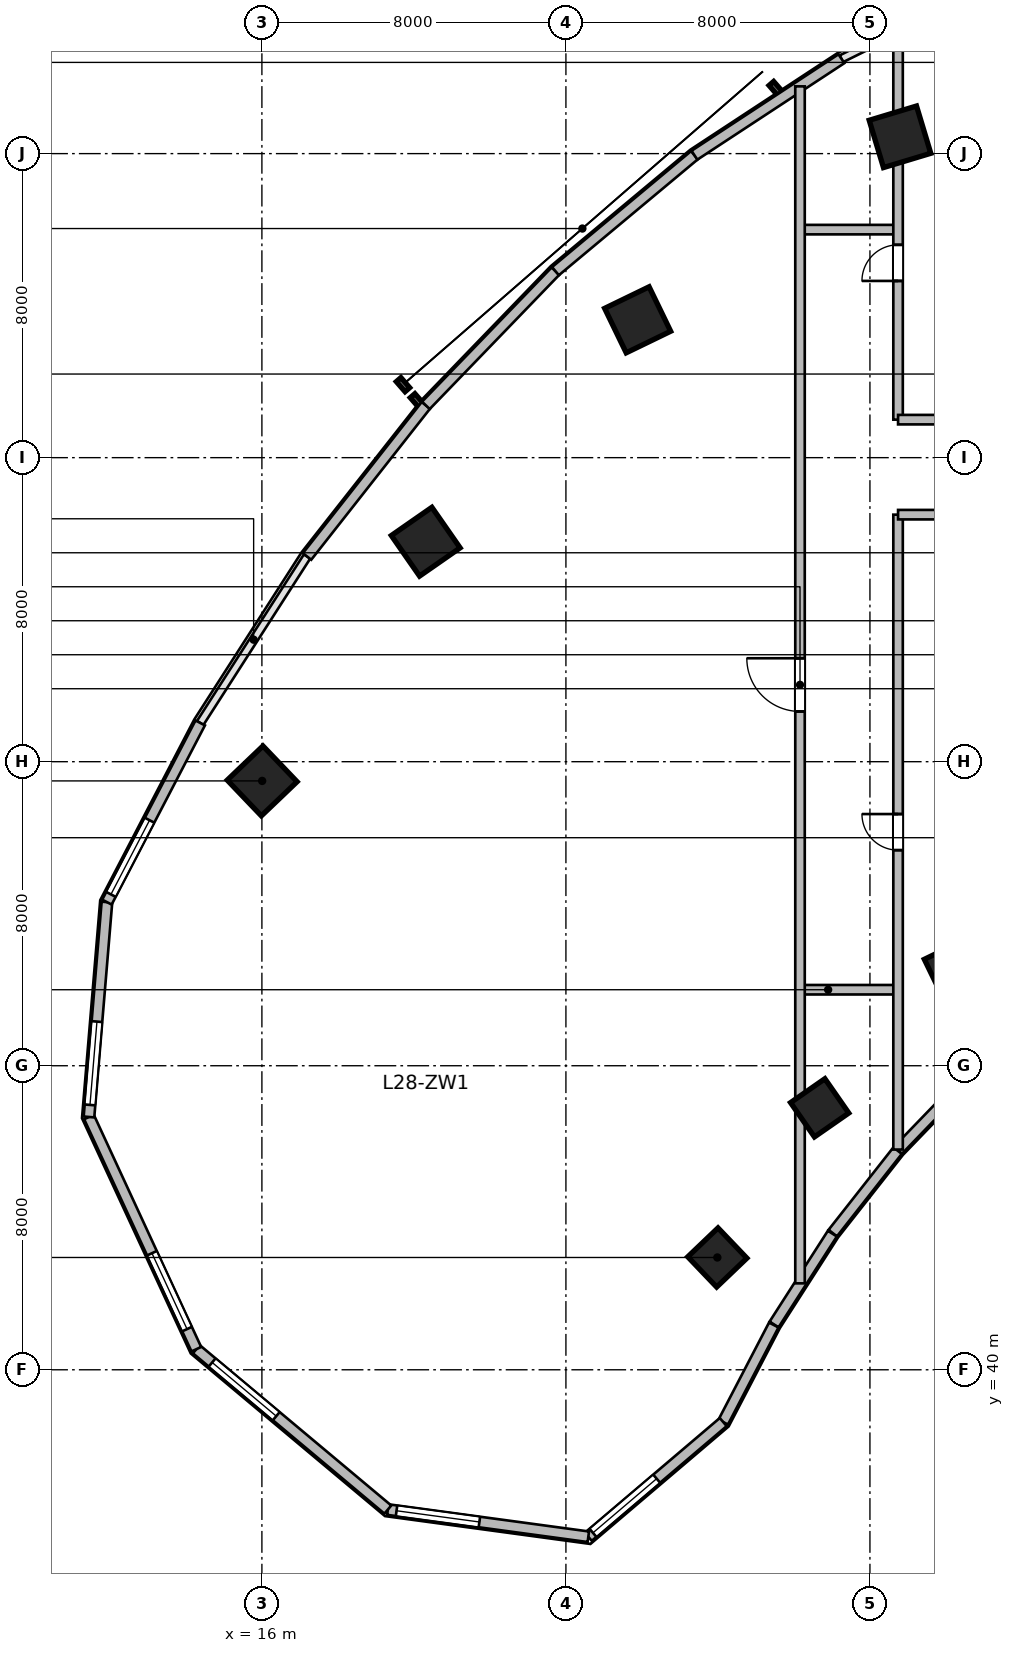
"""IFC4 building model, lengths in metres.
Left out: names, types, materials, properties, quantities, classifications, styles, units other than length and angle.
Written with IfcOpenShell. Run it as: python <this file> out.ifc"""

import sys

from ifc_helpers import new_model, si_unit, direction, frame, frame_2d, origin, origin_2d, place, context, subcontext, project, spatial, rectangle, extrude, source, transform, mapped, element, fill, save


model = new_model("IFC4")
c1 = context("Model", 3, precision=1e-05, world=origin(), true_north=direction((0.0, 1.0)))
c2 = subcontext(c1, "Body", "Model", "MODEL_VIEW")
j1 = project(units=[si_unit("LENGTHUNIT", "METRE"), si_unit("PLANEANGLEUNIT", "RADIAN")], contexts=[c1])
p1 = place(None, origin())
s1 = spatial("IfcSite", under=j1, at=p1, CompositionType="ELEMENT")
p2 = place(p1, origin())
s2 = spatial("IfcBuilding", under=s1, at=p2, CompositionType="ELEMENT")
p3 = place(p2, frame((0.0, 0.0, 119.4)))
s3 = spatial("IfcBuildingStorey", under=s2, at=p3, CompositionType="ELEMENT", Elevation=119.4)
m1 = source(origin(), c2, "Body", "SweptSolid", [
    extrude(rectangle(XDim=1.1, YDim=1.1, at=origin_2d()), origin(), (0.0, 0.0, 1.0), 3.9),
])
p4 = place(p3, frame((27.985, 42.955, 0.0), z_axis=(0.0, 0.0, 1.0), x_axis=(-0.690756218984, 0.723087716626, 0.0)))
e1 = element("IfcColumn", 1, at=p4, inside=s3, PredefinedType="COLUMN", context=c2, shape_type="MappedRepresentation", body=[
    mapped(m1, transform((0.0, 0.0, 0.0), scale=1.0)),
])
m2 = source(origin(), c2, "Body", "SweptSolid", [
    extrude(rectangle(XDim=1.3, YDim=1.3, at=origin_2d()), origin(), (0.0, 0.0, 1.0), 3.9),
])
p5 = place(p3, frame((16.007, 55.494, 0.0), z_axis=(0.0, 0.0, 1.0), x_axis=(-0.690756218984, 0.723087716626, 0.0)))
e2 = element("IfcColumn", 2, at=p5, inside=s3, PredefinedType="COLUMN", context=c2, shape_type="MappedRepresentation", body=[
    mapped(m2, transform((0.0, 0.0, 0.0), scale=1.0)),
])
p6 = place(p3, frame((30.677, 46.892, 0.0), z_axis=(0.0, 0.0, 1.0), x_axis=(-0.571143442153, 0.820850271661, 0.0)))
e3 = element("IfcColumn", 3, at=p6, inside=s3, PredefinedType="COLUMN", context=c2, shape_type="MappedRepresentation", body=[
    mapped(m1, transform((0.0, 0.0, 0.0), scale=1.0)),
])
p7 = place(p3, frame((20.311, 61.789, 0.0), z_axis=(0.0, 0.0, 1.0), x_axis=(-0.571143442153, 0.820850271661, 0.0)))
e4 = element("IfcColumn", 4, at=p7, inside=s3, PredefinedType="COLUMN", context=c2, shape_type="MappedRepresentation", body=[
    mapped(m2, transform((0.0, 0.0, 0.0), scale=1.0)),
])
p8 = place(p3, frame((34.166, 50.545, 0.0), z_axis=(0.0, 0.0, 1.0), x_axis=(-0.436173672171, 0.899862504889, 0.0)))
e5 = element("IfcColumn", 5, at=p8, inside=s3, PredefinedType="COLUMN", context=c2, shape_type="MappedRepresentation", body=[
    mapped(m1, transform((0.0, 0.0, 0.0), scale=1.0)),
])
for number, where, z_axis, x_axis in (
    (6, (25.888, 67.627, 0.0), (0.0, 0.0, 1.0), (-0.436, 0.9, 0.0)),
    (7, (32.791, 72.442, 0.0), (0.0, 0.0, 1.0), (-0.289, 0.957, 0.0)),
):
    element("IfcColumn", number, at=place(p3, frame(where, z_axis=z_axis, x_axis=x_axis)), inside=s3, PredefinedType="COLUMN", context=c2, shape_type="MappedRepresentation", body=[
        mapped(m2, transform((0.0, 0.0, 0.0), scale=1.0)),
    ])
m3 = source(origin(), c2, "Body", "SweptSolid", [
    extrude(rectangle(XDim=2.68, YDim=0.28, at=frame_2d((1.34, 0.0))), origin(), (0.0, 0.0, 1.0), 3.65),
])
p9 = place(p3, frame((34.601, 47.708, 0.0), z_axis=(0.0, 0.0, 1.0), x_axis=(-0.694561996568, -0.719432855049, 0.0)))
e8 = element("IfcWall", 8, at=p9, inside=s3, PredefinedType="SOLIDWALL", context=c2, shape_type="MappedRepresentation", body=[
    mapped(m3, transform((0.0, 0.0, 0.0), scale=1.0)),
])
m4 = source(origin(), c2, "Body", "SweptSolid", [
    extrude(rectangle(XDim=2.76, YDim=0.28, at=frame_2d((1.38, 0.0))), origin(), (0.0, 0.0, 1.0), 3.65),
])
p10 = place(p3, frame((32.728, 45.766, 0.0), z_axis=(0.0, 0.0, 1.0), x_axis=(-0.618180818641, -0.786035925047, 0.0)))
e9 = element("IfcWall", 9, at=p10, inside=s3, PredefinedType="SOLIDWALL", context=c2, shape_type="MappedRepresentation", body=[
    mapped(m4, transform((0.0, 0.0, 0.0), scale=1.0)),
])
m5 = source(origin(), c2, "Body", "SweptSolid", [
    extrude(rectangle(XDim=2.84, YDim=0.28, at=frame_2d((1.42, 0.0))), origin(), (0.0, 0.0, 1.0), 3.65),
])
p11 = place(p3, frame((31.011, 43.582, 0.0), z_axis=(0.0, 0.0, 1.0), x_axis=(-0.540214368057, -0.841527442538, 0.0)))
e10 = element("IfcWall", 10, at=p11, inside=s3, PredefinedType="SOLIDWALL", context=c2, shape_type="MappedRepresentation", body=[
    mapped(m5, transform((0.0, 0.0, 0.0), scale=1.0)),
])
m6 = source(origin(), c2, "Body", "SweptSolid", [
    extrude(rectangle(XDim=2.88, YDim=0.28, at=frame_2d((1.44, 0.0))), origin(), (0.0, 0.0, 1.0), 3.65),
])
p12 = place(p3, frame((29.469, 41.178, 0.0), z_axis=(0.0, 0.0, 1.0), x_axis=(-0.461769086658, -0.887000175088, 0.0)))
e11 = element("IfcWall", 11, at=p12, inside=s3, PredefinedType="SOLIDWALL", context=c2, shape_type="MappedRepresentation", body=[
    mapped(m6, transform((0.0, 0.0, 0.0), scale=1.0)),
])
m7 = source(origin(), c2, "Body", "SweptSolid", [
    extrude(rectangle(XDim=4.659, YDim=0.28, at=frame_2d((2.33, 0.0))), origin(), (0.0, 0.0, 1.0), 3.65),
])
p13 = place(p3, frame((28.139, 38.624, 0.0), z_axis=(0.0, 0.0, 1.0), x_axis=(-0.761913458795, -0.647678841176, 0.0)))
e12 = element("IfcWall", 12, at=p13, inside=s3, PredefinedType="SOLIDWALL", context=c2, shape_type="MappedRepresentation", body=[
    mapped(m7, transform((0.0, 0.0, 0.0), scale=1.0)),
])
p14 = place(p13, frame((2.299, 0.0, 0.95)))
e13 = element("IfcOpeningElement", 13, at=p14, cuts=e12, PredefinedType="OPENING", context=c2, shape_type="SweptSolid", body=[
    extrude(rectangle(XDim=2.2, YDim=2.1, at=frame_2d((1.1, 1.05))), frame((0.0, 0.15, 0.0), z_axis=(0.0, -1.0, 0.0), x_axis=(1.0, 0.0, 0.0)), (0.0, 0.0, 1.0), 0.3),
])
m8 = source(origin(), c2, "Body", "SweptSolid", [
    extrude(rectangle(XDim=5.324, YDim=0.28, at=frame_2d((2.662, 0.0))), origin(), (0.0, 0.0, 1.0), 3.65),
])
p15 = place(p3, frame((24.59, 35.606, 0.0), z_axis=(0.0, 0.0, 1.0), x_axis=(-0.990931467223, 0.134368252451, 0.0)))
e14 = element("IfcWall", 14, at=p15, inside=s3, PredefinedType="SOLIDWALL", context=c2, shape_type="MappedRepresentation", body=[
    mapped(m8, transform((0.0, 0.0, 0.0), scale=1.0)),
])
p16 = place(p15, frame((2.893, 0.0, 0.95)))
e15 = element("IfcOpeningElement", 15, at=p16, cuts=e14, PredefinedType="OPENING", context=c2, shape_type="SweptSolid", body=[
    extrude(rectangle(XDim=2.2, YDim=2.1, at=frame_2d((1.1, 1.05))), frame((0.0, 0.15, 0.0), z_axis=(0.0, -1.0, 0.0), x_axis=(1.0, 0.0, 0.0)), (0.0, 0.0, 1.0), 0.3),
])
m9 = source(origin(), c2, "Body", "SweptSolid", [
    extrude(rectangle(XDim=6.573, YDim=0.28, at=frame_2d((3.287, 0.0))), origin(), (0.0, 0.0, 1.0), 3.65),
])
p17 = place(p3, frame((19.314, 36.322, 0.0), z_axis=(0.0, 0.0, 1.0), x_axis=(-0.766715154163, 0.641987439423, 0.0)))
e16 = element("IfcWall", 16, at=p17, inside=s3, PredefinedType="SOLIDWALL", context=c2, shape_type="MappedRepresentation", body=[
    mapped(m9, transform((0.0, 0.0, 0.0), scale=1.0)),
])
p18 = place(p17, frame((3.83, 0.0, 0.95)))
e17 = element("IfcOpeningElement", 17, at=p18, cuts=e16, PredefinedType="OPENING", context=c2, shape_type="SweptSolid", body=[
    extrude(rectangle(XDim=2.2, YDim=2.1, at=frame_2d((1.1, 1.05))), frame((0.0, 0.15, 0.0), z_axis=(0.0, -1.0, 0.0), x_axis=(1.0, 0.0, 0.0)), (0.0, 0.0, 1.0), 0.3),
])
m10 = source(origin(), c2, "Body", "SweptSolid", [
    extrude(rectangle(XDim=6.732, YDim=0.28, at=frame_2d((3.366, 0.0))), origin(), (0.0, 0.0, 1.0), 3.65),
])
p19 = place(p3, frame((14.275, 40.541, 0.0), z_axis=(0.0, 0.0, 1.0), x_axis=(-0.419644552709, 0.907688520023, 0.0)))
e18 = element("IfcWall", 18, at=p19, inside=s3, PredefinedType="SOLIDWALL", context=c2, shape_type="MappedRepresentation", body=[
    mapped(m10, transform((0.0, 0.0, 0.0), scale=1.0)),
])
p20 = place(p19, frame((0.583, 0.0, 0.95)))
e19 = element("IfcOpeningElement", 19, at=p20, cuts=e18, PredefinedType="OPENING", context=c2, shape_type="SweptSolid", body=[
    extrude(rectangle(XDim=2.2, YDim=2.1, at=frame_2d((1.1, 1.05))), frame((0.0, 0.15, 0.0), z_axis=(0.0, -1.0, 0.0), x_axis=(1.0, 0.0, 0.0)), (0.0, 0.0, 1.0), 0.3),
])
m11 = source(origin(), c2, "Body", "SweptSolid", [
    extrude(rectangle(XDim=5.674, YDim=0.28, at=frame_2d((2.837, 0.0))), origin(), (0.0, 0.0, 1.0), 3.65),
])
p21 = place(p3, frame((11.45, 46.652, 0.0), z_axis=(0.0, 0.0, 1.0), x_axis=(0.083309007867, 0.996523762491, 0.0)))
e20 = element("IfcWall", 20, at=p21, inside=s3, PredefinedType="SOLIDWALL", context=c2, shape_type="MappedRepresentation", body=[
    mapped(m11, transform((0.0, 0.0, 0.0), scale=1.0)),
])
p22 = place(p21, frame((0.318, 0.0, 0.95)))
e21 = element("IfcOpeningElement", 21, at=p22, cuts=e20, PredefinedType="OPENING", context=c2, shape_type="SweptSolid", body=[
    extrude(rectangle(XDim=2.2, YDim=2.1, at=frame_2d((1.1, 1.05))), frame((0.0, 0.15, 0.0), z_axis=(0.0, -1.0, 0.0), x_axis=(1.0, 0.0, 0.0)), (0.0, 0.0, 1.0), 0.3),
])
m12 = source(origin(), c2, "Body", "SweptSolid", [
    extrude(rectangle(XDim=5.315, YDim=0.28, at=frame_2d((2.658, 0.0))), origin(), (0.0, 0.0, 1.0), 3.65),
])
p23 = place(p3, frame((11.922, 52.305, 0.0), z_axis=(0.0, 0.0, 1.0), x_axis=(0.461760527822, 0.887004630735, 0.0)))
e22 = element("IfcWall", 22, at=p23, inside=s3, PredefinedType="SOLIDWALL", context=c2, shape_type="MappedRepresentation", body=[
    mapped(m12, transform((0.0, 0.0, 0.0), scale=1.0)),
])
p24 = place(p23, frame((0.229, 0.0, 0.95)))
e23 = element("IfcOpeningElement", 23, at=p24, cuts=e22, PredefinedType="OPENING", context=c2, shape_type="SweptSolid", body=[
    extrude(rectangle(XDim=2.2, YDim=2.1, at=frame_2d((1.1, 1.05))), frame((0.0, 0.15, 0.0), z_axis=(0.0, -1.0, 0.0), x_axis=(1.0, 0.0, 0.0)), (0.0, 0.0, 1.0), 0.3),
])
m13 = source(origin(), c2, "Body", "SweptSolid", [
    extrude(rectangle(XDim=5.058, YDim=0.28, at=frame_2d((2.529, 0.0))), origin(), (0.0, 0.0, 1.0), 3.65),
])
p25 = place(p3, frame((17.188, 61.4, 0.0), z_axis=(0.0, 0.0, 1.0), x_axis=(0.618145507434, 0.786063694391, 0.0)))
e24 = element("IfcWall", 24, at=p25, inside=s3, PredefinedType="SOLIDWALL", context=c2, shape_type="MappedRepresentation", body=[
    mapped(m13, transform((0.0, 0.0, 0.0), scale=1.0)),
])
m14 = source(origin(), c2, "Body", "SweptSolid", [
    extrude(rectangle(XDim=4.908, YDim=0.28, at=frame_2d((2.454, 0.0))), origin(), (0.0, 0.0, 1.0), 3.65),
])
p26 = place(p3, frame((20.315, 65.376, 0.0), z_axis=(0.0, 0.0, 1.0), x_axis=(0.694613154328, 0.719383462302, 0.0)))
e25 = element("IfcWall", 25, at=p26, inside=s3, PredefinedType="SOLIDWALL", context=c2, shape_type="MappedRepresentation", body=[
    mapped(m14, transform((0.0, 0.0, 0.0), scale=1.0)),
])
m15 = source(origin(), c2, "Body", "SweptSolid", [
    extrude(rectangle(XDim=4.762, YDim=0.28, at=frame_2d((2.381, 0.0))), origin(), (0.0, 0.0, 1.0), 3.65),
])
p27 = place(p3, frame((23.725, 68.907, 0.0), z_axis=(0.0, 0.0, 1.0), x_axis=(0.767952279762, 0.640507061638, 0.0)))
e26 = element("IfcWall", 26, at=p27, inside=s3, PredefinedType="SOLIDWALL", context=c2, shape_type="MappedRepresentation", body=[
    mapped(m15, transform((0.0, 0.0, 0.0), scale=1.0)),
])
m16 = source(origin(), c2, "Body", "SweptSolid", [
    extrude(rectangle(XDim=4.626, YDim=0.28, at=frame_2d((2.313, 0.0))), origin(), (0.0, 0.0, 1.0), 3.65),
])
p28 = place(p3, frame((27.382, 71.958, 0.0), z_axis=(0.0, 0.0, 1.0), x_axis=(0.83595938331, 0.548791316855, 0.0)))
e27 = element("IfcWall", 27, at=p28, inside=s3, PredefinedType="SOLIDWALL", context=c2, shape_type="MappedRepresentation", body=[
    mapped(m16, transform((0.0, 0.0, 0.0), scale=1.0)),
])
m17 = source(origin(), c2, "Body", "SweptSolid", [
    extrude(rectangle(XDim=2.5, YDim=0.25, at=frame_2d((1.25, 0.0))), origin(), (0.0, 0.0, 1.0), 3.65),
])
for number, where, z_axis, x_axis in (
    (28, (30.2, 50.0, 0.0), (0.0, 0.0, 1.0), (1.0, 0.0, 0.0)),
    (29, (30.2, 70.0, 0.0), (0.0, 0.0, 1.0), (1.0, 0.0, 0.0)),
):
    element("IfcWall", number, at=place(p3, frame(where, z_axis=z_axis, x_axis=x_axis)), inside=s3, PredefinedType="PARTITIONING", context=c2, shape_type="MappedRepresentation", body=[
        mapped(m17, transform((0.0, 0.0, 0.0), scale=1.0)),
    ])
m18 = source(origin(), c2, "Body", "SweptSolid", [
    extrude(rectangle(XDim=31.495, YDim=0.25, at=frame_2d((15.748, 0.0))), origin(), (0.0, 0.0, 1.0), 2.942),
])
p29 = place(p3, frame((30.16, 42.274, 0.0), z_axis=(0.0, 0.0, 1.0), x_axis=(0.0, 1.0, 0.0)))
e30 = element("IfcWall", 30, at=p29, inside=s3, PredefinedType="PARTITIONING", context=c2, shape_type="MappedRepresentation", body=[
    mapped(m18, transform((0.0, 0.0, 0.0), scale=1.0)),
])
p30 = place(p29, frame((15.048, 0.0, 0.0)))
e31 = element("IfcOpeningElement", 31, at=p30, cuts=e30, PredefinedType="OPENING", context=c2, shape_type="SweptSolid", body=[
    extrude(rectangle(XDim=1.4, YDim=2.15, at=frame_2d((0.7, 1.075))), frame((0.0, 0.135, 0.0), z_axis=(0.0, -1.0, 0.0), x_axis=(1.0, 0.0, 0.0)), (0.0, 0.0, 1.0), 0.27),
])
m19 = source(origin(), c2, "Body", "SweptSolid", [
    extrude(rectangle(XDim=16.706, YDim=0.25, at=frame_2d((8.353, 0.0))), origin(), (0.0, 0.0, 1.0), 2.942),
])
p31 = place(p3, frame((32.74, 45.794, 0.0), z_axis=(0.0, 0.0, 1.0), x_axis=(0.0, 1.0, 0.0)))
e32 = element("IfcWall", 32, at=p31, inside=s3, PredefinedType="PARTITIONING", context=c2, shape_type="MappedRepresentation", body=[
    mapped(m19, transform((0.0, 0.0, 0.0), scale=1.0)),
])
p32 = place(p31, frame((7.878, 0.0, 0.0)))
e33 = element("IfcOpeningElement", 33, at=p32, cuts=e32, PredefinedType="OPENING", context=c2, shape_type="SweptSolid", body=[
    extrude(rectangle(XDim=0.95, YDim=2.1, at=frame_2d((0.475, 1.05))), frame((0.0, 0.135, 0.0), z_axis=(0.0, -1.0, 0.0), x_axis=(1.0, 0.0, 0.0)), (0.0, 0.0, 1.0), 0.27),
])
m20 = source(origin(), c2, "Body", "SweptSolid", [
    extrude(rectangle(XDim=1.66, YDim=0.25, at=frame_2d((0.83, 0.0))), origin(), (0.0, 0.0, 1.0), 3.65),
])
p33 = place(p3, frame((32.74, 62.5, 0.0), z_axis=(0.0, 0.0, 1.0), x_axis=(1.0, 0.0, 0.0)))
e34 = element("IfcWall", 34, at=p33, inside=s3, PredefinedType="PARTITIONING", context=c2, shape_type="MappedRepresentation", body=[
    mapped(m20, transform((0.0, 0.0, 0.0), scale=1.0)),
])
m21 = source(origin(), c2, "Body", "SweptSolid", [
    extrude(rectangle(XDim=10.224, YDim=0.25, at=frame_2d((5.112, 0.0))), origin(), (0.0, 0.0, 1.0), 3.65),
])
p34 = place(p3, frame((32.74, 65.0, 0.0), z_axis=(0.0, 0.0, 1.0), x_axis=(0.0, 1.0, 0.0)))
e35 = element("IfcWall", 35, at=p34, inside=s3, PredefinedType="PARTITIONING", context=c2, shape_type="MappedRepresentation", body=[
    mapped(m21, transform((0.0, 0.0, 0.0), scale=1.0)),
])
p35 = place(p34, frame((3.65, 0.0, 0.0)))
e36 = element("IfcOpeningElement", 36, at=p35, cuts=e35, PredefinedType="OPENING", context=c2, shape_type="SweptSolid", body=[
    extrude(rectangle(XDim=0.95, YDim=2.1, at=frame_2d((0.475, 1.05))), frame((0.0, 0.135, 0.0), z_axis=(0.0, -1.0, 0.0), x_axis=(1.0, 0.0, 0.0)), (0.0, 0.0, 1.0), 0.27),
])
p36 = place(p3, frame((32.74, 65.0, 0.0), z_axis=(0.0, 0.0, 1.0), x_axis=(1.0, 0.0, 0.0)))
e37 = element("IfcWall", 37, at=p36, inside=s3, PredefinedType="PARTITIONING", context=c2, shape_type="MappedRepresentation", body=[
    mapped(m20, transform((0.0, 0.0, 0.0), scale=1.0)),
])
m22 = source(origin(), c2, "Body", "SweptSolid", [
    extrude(rectangle(XDim=2.2, YDim=2.1, at=frame_2d((1.1, 1.05))), frame((0.0, 0.03, 0.0), z_axis=(0.0, -1.0, 0.0), x_axis=(1.0, 0.0, 0.0)), (0.0, 0.0, 1.0), 0.06),
])
p37 = place(p14, origin())
e38 = element("IfcWindow", 38, at=p37, inside=s3, PartitioningType="TRIPLE_PANEL_VERTICAL", PredefinedType="WINDOW", context=c2, shape_type="MappedRepresentation", body=[
    mapped(m22, transform((0.0, 0.0, 0.0), scale=1.0)),
])
fill(e13, e38)
p38 = place(p16, origin())
e39 = element("IfcWindow", 39, at=p38, inside=s3, PartitioningType="TRIPLE_PANEL_VERTICAL", PredefinedType="WINDOW", context=c2, shape_type="MappedRepresentation", body=[
    mapped(m22, transform((0.0, 0.0, 0.0), scale=1.0)),
])
fill(e15, e39)
p39 = place(p18, origin())
e40 = element("IfcWindow", 40, at=p39, inside=s3, PartitioningType="TRIPLE_PANEL_VERTICAL", PredefinedType="WINDOW", context=c2, shape_type="MappedRepresentation", body=[
    mapped(m22, transform((0.0, 0.0, 0.0), scale=1.0)),
])
fill(e17, e40)
p40 = place(p20, origin())
e41 = element("IfcWindow", 41, at=p40, inside=s3, PartitioningType="TRIPLE_PANEL_VERTICAL", PredefinedType="WINDOW", context=c2, shape_type="MappedRepresentation", body=[
    mapped(m22, transform((0.0, 0.0, 0.0), scale=1.0)),
])
fill(e19, e41)
p41 = place(p22, origin())
e42 = element("IfcWindow", 42, at=p41, inside=s3, PartitioningType="TRIPLE_PANEL_VERTICAL", PredefinedType="WINDOW", context=c2, shape_type="MappedRepresentation", body=[
    mapped(m22, transform((0.0, 0.0, 0.0), scale=1.0)),
])
fill(e21, e42)
p42 = place(p24, origin())
e43 = element("IfcWindow", 43, at=p42, inside=s3, PartitioningType="TRIPLE_PANEL_VERTICAL", PredefinedType="WINDOW", context=c2, shape_type="MappedRepresentation", body=[
    mapped(m22, transform((0.0, 0.0, 0.0), scale=1.0)),
])
fill(e23, e43)
m23 = source(origin(), c2, "Body", "SweptSolid", [
    extrude(rectangle(XDim=1.4, YDim=2.15, at=frame_2d((0.7, 1.075))), frame((0.0, 0.025, 0.0), z_axis=(0.0, -1.0, 0.0), x_axis=(1.0, 0.0, 0.0)), (0.0, 0.0, 1.0), 0.05),
])
p43 = place(p30, origin())
e44 = element("IfcDoor", 44, at=p43, inside=s3, OperationType="SINGLE_SWING_RIGHT", PredefinedType="DOOR", context=c2, shape_type="MappedRepresentation", body=[
    mapped(m23, transform((0.0, 0.0, 0.0), scale=1.0)),
])
fill(e31, e44)
m24 = source(origin(), c2, "Body", "SweptSolid", [
    extrude(rectangle(XDim=0.95, YDim=2.1, at=frame_2d((0.475, 1.05))), frame((0.0, 0.025, 0.0), z_axis=(0.0, -1.0, 0.0), x_axis=(1.0, 0.0, 0.0)), (0.0, 0.0, 1.0), 0.05),
])
p44 = place(p32, origin())
e45 = element("IfcDoor", 45, at=p44, inside=s3, OperationType="SINGLE_SWING_RIGHT", PredefinedType="DOOR", context=c2, shape_type="MappedRepresentation", body=[
    mapped(m24, transform((0.0, 0.0, 0.0), scale=1.0)),
])
fill(e33, e45)
p45 = place(p35, origin())
e46 = element("IfcDoor", 46, at=p45, inside=s3, OperationType="SINGLE_SWING_LEFT", PredefinedType="DOOR", context=c2, shape_type="MappedRepresentation", body=[
    mapped(m24, transform((0.0, 0.0, 0.0), scale=1.0)),
])
fill(e36, e46)
save(model, sys.argv[1])
